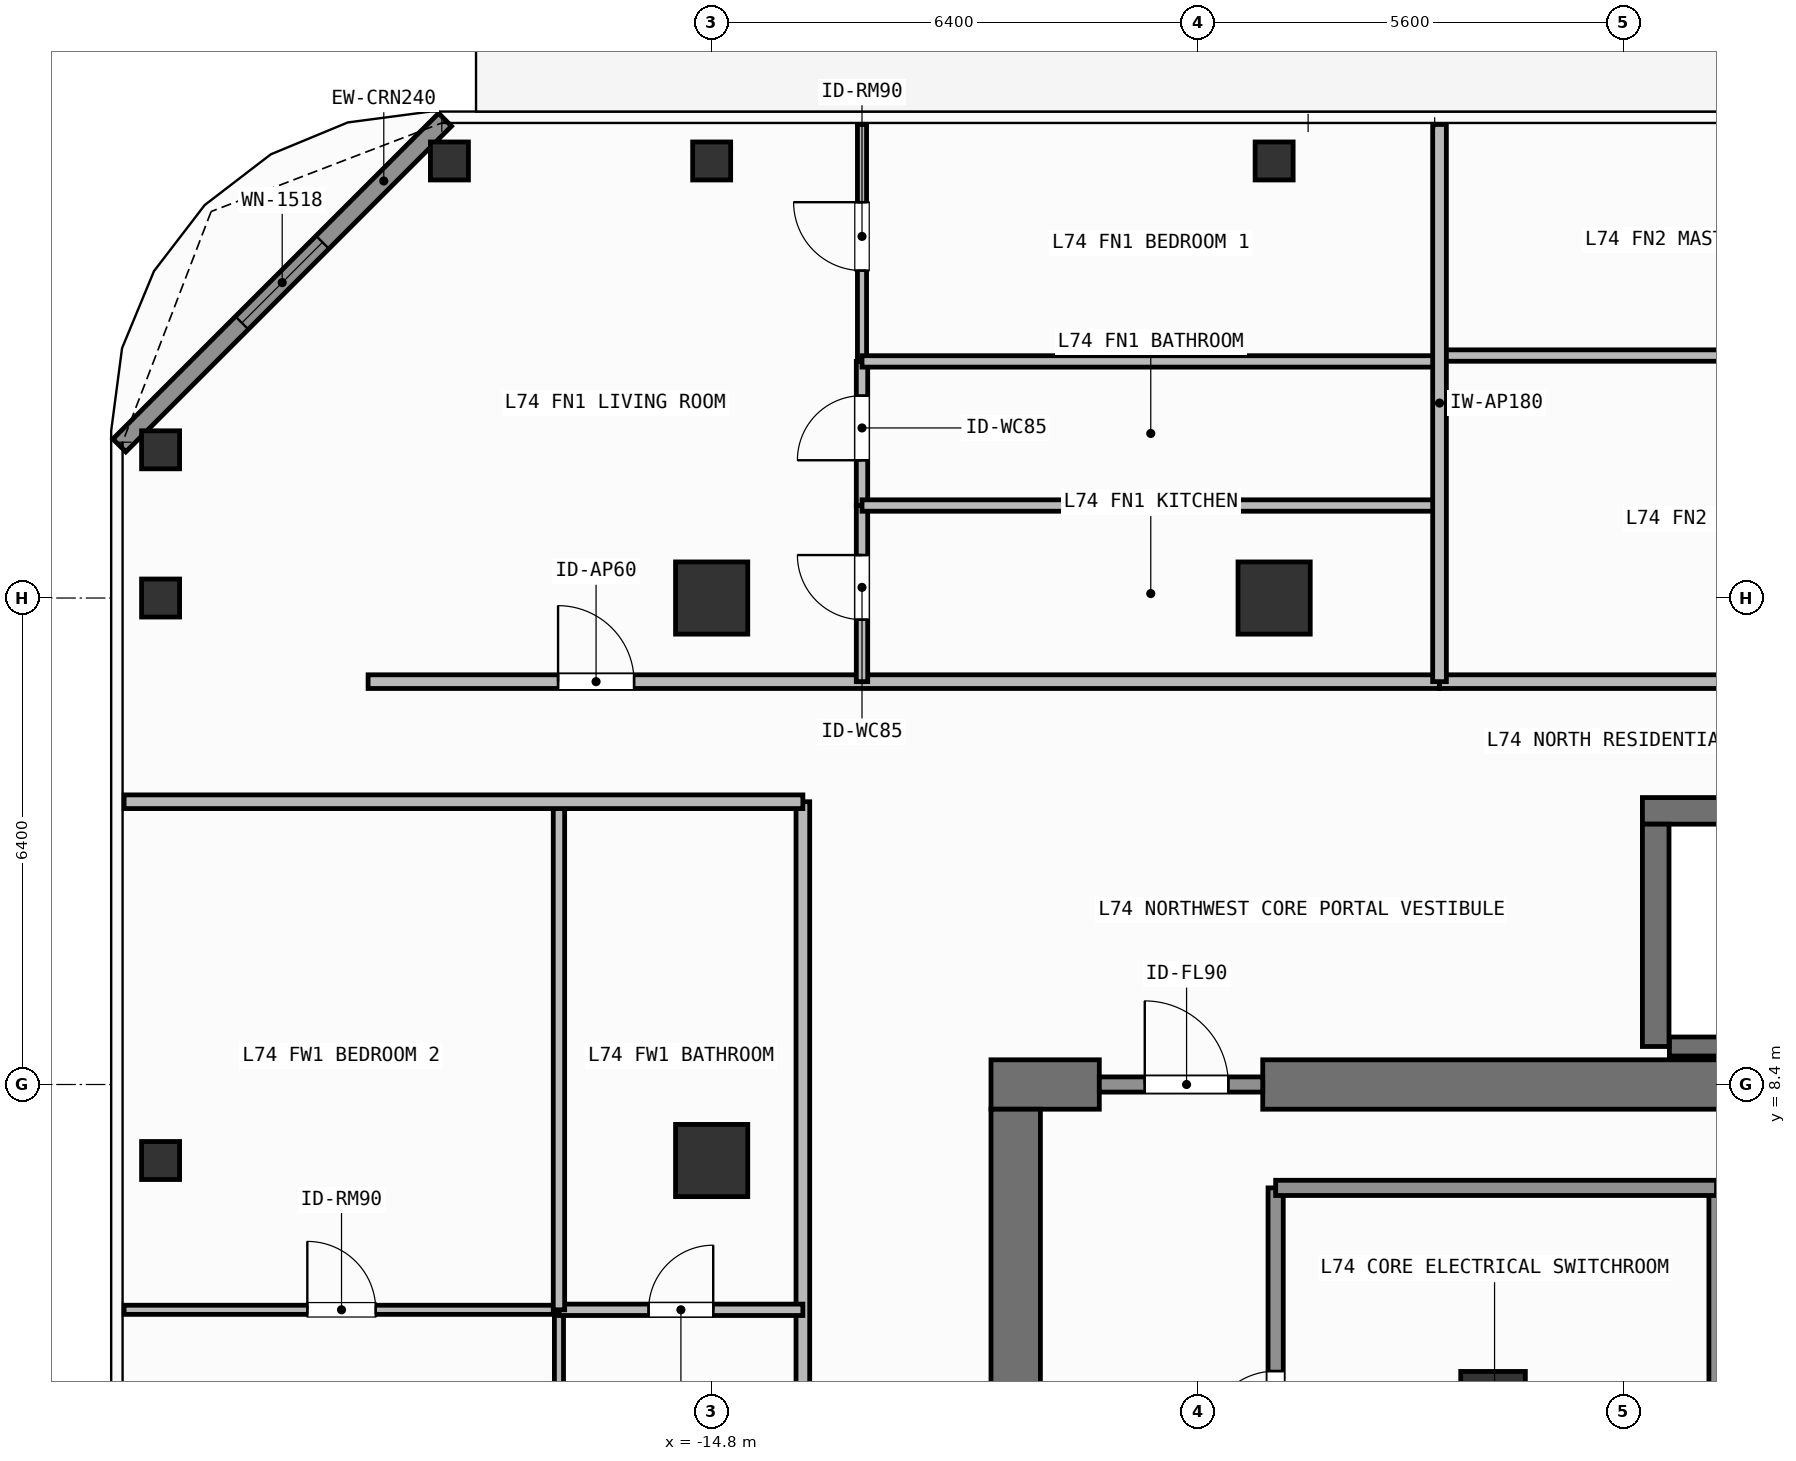
"""IFC4 building model, lengths in metres.
Left out: names, types, materials, properties, quantities, classifications, styles, units other than length and angle.
Written with IfcOpenShell. Run it as: python <this file> out.ifc"""

import sys

from ifc_helpers import new_model, si_unit, direction, frame, frame_2d, origin, origin_2d, place, context, subcontext, project, spatial, rectangle, hollow_rectangle, extrude, element, fill, save


model = new_model("IFC4")
c1 = context("Model", 3, precision=1e-05, world=origin(), true_north=direction((0.0, 1.0)))
c2 = subcontext(c1, "Body", "Model", "MODEL_VIEW")
j1 = project(units=[si_unit("LENGTHUNIT", "METRE"), si_unit("PLANEANGLEUNIT", "RADIAN")], contexts=[c1])
p1 = place(None, origin())
s1 = spatial("IfcSite", under=j1, at=p1, CompositionType="ELEMENT")
p2 = place(p1, origin())
s2 = spatial("IfcBuilding", under=s1, at=p2, CompositionType="ELEMENT")
p3 = place(p2, frame((0.0, 0.0, 301.5)))
s3 = spatial("IfcBuildingStorey", under=s2, at=p3, CompositionType="ELEMENT", Elevation=301.5)
p4 = place(p3, frame((-11.125, 8.4, 0.0), z_axis=(0.0, 0.0, 1.0), x_axis=(1.0, 0.0, 0.0)))
e1 = element("IfcWall", 1, at=p4, inside=s3, PredefinedType="SHEAR", context=c2, shape_type="SweptSolid", body=[
    extrude(rectangle(XDim=1.425, YDim=0.65, at=frame_2d((0.712, 0.0))), origin(), (0.0, 0.0, 1.0), 3.9),
])
p5 = place(p3, frame((-7.55, 8.4, 0.0), z_axis=(0.0, 0.0, 1.0), x_axis=(1.0, 0.0, 0.0)))
e2 = element("IfcWall", 2, at=p5, inside=s3, PredefinedType="SHEAR", context=c2, shape_type="SweptSolid", body=[
    extrude(rectangle(XDim=16.275, YDim=0.65, at=frame_2d((8.138, 0.0))), origin(), (0.0, 0.0, 1.0), 3.9),
])
p6 = place(p3, frame((-10.8, -8.075, 0.0), z_axis=(0.0, 0.0, 1.0), x_axis=(0.0, 1.0, 0.0)))
e3 = element("IfcWall", 3, at=p6, inside=s3, PredefinedType="SHEAR", context=c2, shape_type="SweptSolid", body=[
    extrude(rectangle(XDim=16.15, YDim=0.65, at=frame_2d((8.075, 0.0))), origin(), (0.0, 0.0, 1.0), 3.9),
])
p7 = place(p3, frame((-2.555, 12.0, 0.0), z_axis=(0.0, 0.0, 1.0), x_axis=(1.0, 0.0, 0.0)))
e4 = element("IfcWall", 4, at=p7, inside=s3, PredefinedType="SHEAR", context=c2, shape_type="SweptSolid", body=[
    extrude(rectangle(XDim=7.31, YDim=0.35, at=frame_2d((3.655, 0.0))), origin(), (0.0, 0.0, 1.0), 3.9),
])
p8 = place(p3, frame((-2.2, 8.9, 0.0), z_axis=(0.0, 0.0, 1.0), x_axis=(1.0, 0.0, 0.0)))
e5 = element("IfcWall", 5, at=p8, inside=s3, PredefinedType="SHEAR", context=c2, shape_type="SweptSolid", body=[
    extrude(rectangle(XDim=6.6, YDim=0.25, at=frame_2d((3.3, 0.0))), origin(), (0.0, 0.0, 1.0), 3.9),
])
p9 = place(p3, frame((-2.38, 8.9, 0.0), z_axis=(0.0, 0.0, 1.0), x_axis=(0.0, 1.0, 0.0)))
e6 = element("IfcWall", 6, at=p9, inside=s3, PredefinedType="SHEAR", context=c2, shape_type="SweptSolid", body=[
    extrude(rectangle(XDim=2.925, YDim=0.35, at=frame_2d((1.462, 0.0))), origin(), (0.0, 0.0, 1.0), 3.9),
])
for number, where, z_axis, x_axis in (
    (7, (-14.8, 14.8, 0.0), (0.0, 0.0, 1.0), (1.0, 0.0, 0.0)),
    (8, (-7.4, 14.8, 0.0), (0.0, 0.0, 1.0), (1.0, 0.0, 0.0)),
    (9, (-14.8, 7.4, 0.0), (0.0, 0.0, 1.0), (1.0, 0.0, 0.0)),
):
    element("IfcColumn", number, at=place(p3, frame(where, z_axis=z_axis, x_axis=x_axis)), inside=s3, PredefinedType="COLUMN", context=c2, shape_type="SweptSolid", body=[
        extrude(rectangle(XDim=0.95, YDim=0.95, at=origin_2d()), origin(), (0.0, 0.0, 1.0), 3.9),
    ])
p10 = place(p3, frame((-4.52, 4.2, 0.0), z_axis=(0.0, 0.0, 1.0), x_axis=(1.0, 0.0, 0.0)))
e10 = element("IfcColumn", 10, at=p10, inside=s3, PredefinedType="COLUMN", context=c2, shape_type="SweptSolid", body=[
    extrude(rectangle(XDim=0.85, YDim=0.85, at=origin_2d()), origin(), (0.0, 0.0, 1.0), 3.9),
])
for number, where, z_axis, x_axis in (
    (11, (-18.25, 20.55, 0.0), (0.0, 0.0, 1.0), (1.0, 0.0, 0.0)),
    (12, (-22.05, 16.75, 0.0), (0.0, 0.0, 1.0), (1.0, 0.0, 0.0)),
    (13, (-14.8, 20.55, 0.0), (0.0, 0.0, 1.0), (1.0, 0.0, 0.0)),
    (14, (-7.4, 20.55, 0.0), (0.0, 0.0, 1.0), (1.0, 0.0, 0.0)),
    (15, (-22.05, 7.4, 0.0), (0.0, 0.0, 1.0), (1.0, 0.0, 0.0)),
    (16, (-22.05, 14.8, 0.0), (0.0, 0.0, 1.0), (1.0, 0.0, 0.0)),
):
    element("IfcColumn", number, at=place(p3, frame(where, z_axis=z_axis, x_axis=x_axis)), inside=s3, PredefinedType="COLUMN", context=c2, shape_type="SweptSolid", body=[
        extrude(hollow_rectangle(XDim=0.5, YDim=0.5, WallThickness=0.025, at=origin_2d()), origin(), (0.0, 0.0, 1.0), 3.9),
    ])
p11 = place(p3, frame((-22.592, 16.808, 0.0), z_axis=(0.0, 0.0, 1.0), x_axis=(0.707106781187, 0.707106781187, 0.0)))
e17 = element("IfcWall", 17, at=p11, inside=s3, PredefinedType="SOLIDWALL", context=c2, shape_type="SweptSolid", body=[
    extrude(rectangle(XDim=6.059, YDim=0.24, at=frame_2d((3.03, 0.0))), origin(), (0.0, 0.0, 1.0), 3.68),
])
p12 = place(p11, frame((2.28, 0.0, 0.8)))
e18 = element("IfcOpeningElement", 18, at=p12, cuts=e17, PredefinedType="OPENING", context=c2, shape_type="SweptSolid", body=[
    extrude(rectangle(XDim=1.5, YDim=1.85, at=frame_2d((0.75, 0.925))), frame((0.0, 0.13, 0.0), z_axis=(0.0, -1.0, 0.0), x_axis=(1.0, 0.0, 0.0)), (0.0, 0.0, 1.0), 0.26),
])
p13 = place(p3, frame((-9.7, 8.4, 0.0), z_axis=(0.0, 0.0, 1.0), x_axis=(1.0, 0.0, 0.0)))
e19 = element("IfcWall", 19, at=p13, inside=s3, PredefinedType="SOLIDWALL", context=c2, shape_type="SweptSolid", body=[
    extrude(rectangle(XDim=2.15, YDim=0.2, at=frame_2d((1.075, 0.0))), origin(), (0.0, 0.0, 1.0), 2.92),
])
p14 = place(p13, frame((0.598, 0.0, 0.0)))
e20 = element("IfcOpeningElement", 20, at=p14, cuts=e19, PredefinedType="OPENING", context=c2, shape_type="SweptSolid", body=[
    extrude(rectangle(XDim=1.1, YDim=2.15, at=frame_2d((0.55, 1.075))), frame((0.0, 0.11, 0.0), z_axis=(0.0, -1.0, 0.0), x_axis=(1.0, 0.0, 0.0)), (0.0, 0.0, 1.0), 0.22),
])
p15 = place(p3, frame((-7.38, 1.3, 0.0), z_axis=(0.0, 0.0, 1.0), x_axis=(0.0, 1.0, 0.0)))
e21 = element("IfcWall", 21, at=p15, inside=s3, PredefinedType="SOLIDWALL", context=c2, shape_type="SweptSolid", body=[
    extrude(rectangle(XDim=5.74, YDim=0.2, at=frame_2d((2.87, 0.0))), origin(), (0.0, 0.0, 1.0), 3.68),
])
p16 = place(p15, frame((2.41, 0.0, 0.0)))
e22 = element("IfcOpeningElement", 22, at=p16, cuts=e21, PredefinedType="OPENING", context=c2, shape_type="SweptSolid", body=[
    extrude(rectangle(XDim=0.92, YDim=2.1, at=frame_2d((0.46, 1.05))), frame((0.0, 0.11, 0.0), z_axis=(0.0, -1.0, 0.0), x_axis=(1.0, 0.0, 0.0)), (0.0, 0.0, 1.0), 0.22),
])
p17 = place(p3, frame((-19.32, 13.7, 0.0), z_axis=(0.0, 0.0, 1.0), x_axis=(1.0, 0.0, 0.0)))
e23 = element("IfcWall", 23, at=p17, inside=s3, PredefinedType="PARTITIONING", context=c2, shape_type="SweptSolid", body=[
    extrude(rectangle(XDim=14.096, YDim=0.18, at=frame_2d((7.048, 0.0))), origin(), (0.0, 0.0, 1.0), 3.68),
])
p18 = place(p17, frame((2.499, 0.0, 0.0)))
e24 = element("IfcOpeningElement", 24, at=p18, cuts=e23, PredefinedType="OPENING", context=c2, shape_type="SweptSolid", body=[
    extrude(rectangle(XDim=1.0, YDim=2.2, at=frame_2d((0.5, 1.1))), frame((0.0, 0.1, 0.0), z_axis=(0.0, -1.0, 0.0), x_axis=(1.0, 0.0, 0.0)), (0.0, 0.0, 1.0), 0.2),
])
p19 = place(p3, frame((-12.822, 13.7, 0.0), z_axis=(0.0, 0.0, 1.0), x_axis=(0.0, 1.0, 0.0)))
e25 = element("IfcWall", 25, at=p19, inside=s3, PredefinedType="PARTITIONING", context=c2, shape_type="SweptSolid", body=[
    extrude(rectangle(XDim=2.317, YDim=0.15, at=frame_2d((1.159, 0.0))), origin(), (0.0, 0.0, 1.0), 3.68),
])
p20 = place(p19, frame((0.815, 0.0, 0.0)))
e26 = element("IfcOpeningElement", 26, at=p20, cuts=e25, PredefinedType="OPENING", context=c2, shape_type="SweptSolid", body=[
    extrude(rectangle(XDim=0.85, YDim=2.1, at=frame_2d((0.425, 1.05))), frame((0.0, 0.085, 0.0), z_axis=(0.0, -1.0, 0.0), x_axis=(1.0, 0.0, 0.0)), (0.0, 0.0, 1.0), 0.17),
])
p21 = place(p3, frame((-12.822, 16.017, 0.0), z_axis=(0.0, 0.0, 1.0), x_axis=(0.0, 1.0, 0.0)))
e27 = element("IfcWall", 27, at=p21, inside=s3, PredefinedType="PARTITIONING", context=c2, shape_type="SweptSolid", body=[
    extrude(rectangle(XDim=1.896, YDim=0.15, at=frame_2d((0.948, 0.0))), origin(), (0.0, 0.0, 1.0), 3.68),
])
p22 = place(p21, frame((0.596, 0.0, 0.0)))
e28 = element("IfcOpeningElement", 28, at=p22, cuts=e27, PredefinedType="OPENING", context=c2, shape_type="SweptSolid", body=[
    extrude(rectangle(XDim=0.85, YDim=2.1, at=frame_2d((0.425, 1.05))), frame((0.0, 0.085, 0.0), z_axis=(0.0, -1.0, 0.0), x_axis=(1.0, 0.0, 0.0)), (0.0, 0.0, 1.0), 0.17),
])
p23 = place(p3, frame((-12.822, 17.913, 0.0), z_axis=(0.0, 0.0, 1.0), x_axis=(0.0, 1.0, 0.0)))
e29 = element("IfcWall", 29, at=p23, inside=s3, PredefinedType="PARTITIONING", context=c2, shape_type="SweptSolid", body=[
    extrude(rectangle(XDim=3.117, YDim=0.12, at=frame_2d((1.559, 0.0))), origin(), (0.0, 0.0, 1.0), 3.68),
])
p24 = place(p23, frame((1.195, 0.0, 0.0)))
e30 = element("IfcOpeningElement", 30, at=p24, cuts=e29, PredefinedType="OPENING", context=c2, shape_type="SweptSolid", body=[
    extrude(rectangle(XDim=0.9, YDim=2.1, at=frame_2d((0.45, 1.05))), frame((0.0, 0.07, 0.0), z_axis=(0.0, -1.0, 0.0), x_axis=(1.0, 0.0, 0.0)), (0.0, 0.0, 1.0), 0.14),
])
p25 = place(p3, frame((-5.224, 13.7, 0.0), z_axis=(0.0, 0.0, 1.0), x_axis=(1.0, 0.0, 0.0)))
e31 = element("IfcWall", 31, at=p25, inside=s3, PredefinedType="PARTITIONING", context=c2, shape_type="SweptSolid", body=[
    extrude(rectangle(XDim=21.144, YDim=0.18, at=frame_2d((10.572, 0.0))), origin(), (0.0, 0.0, 1.0), 3.68),
])
p26 = place(p25, frame((10.876, 0.0, 0.0)))
e32 = element("IfcOpeningElement", 32, at=p26, cuts=e31, PredefinedType="OPENING", context=c2, shape_type="SweptSolid", body=[
    extrude(rectangle(XDim=1.0, YDim=2.2, at=frame_2d((0.5, 1.1))), frame((0.0, 0.1, 0.0), z_axis=(0.0, -1.0, 0.0), x_axis=(1.0, 0.0, 0.0)), (0.0, 0.0, 1.0), 0.2),
])
p27 = place(p3, frame((-13.6, -12.12, 0.0), z_axis=(0.0, 0.0, 1.0), x_axis=(0.0, 1.0, 0.0)))
e33 = element("IfcWall", 33, at=p27, inside=s3, PredefinedType="PARTITIONING", context=c2, shape_type="SweptSolid", body=[
    extrude(rectangle(XDim=24.24, YDim=0.18, at=frame_2d((12.12, 0.0))), origin(), (0.0, 0.0, 1.0), 3.68),
])
p28 = place(p27, frame((9.829, 0.0, 0.0)))
e34 = element("IfcOpeningElement", 34, at=p28, cuts=e33, PredefinedType="OPENING", context=c2, shape_type="SweptSolid", body=[
    extrude(rectangle(XDim=1.0, YDim=2.2, at=frame_2d((0.5, 1.1))), frame((0.0, 0.1, 0.0), z_axis=(0.0, -1.0, 0.0), x_axis=(1.0, 0.0, 0.0)), (0.0, 0.0, 1.0), 0.2),
])
p29 = place(p3, frame((-16.809, -9.32, 0.0), z_axis=(0.0, 0.0, 1.0), x_axis=(0.0, 1.0, 0.0)))
e35 = element("IfcWall", 35, at=p29, inside=s3, PredefinedType="PARTITIONING", context=c2, shape_type="SweptSolid", body=[
    extrude(rectangle(XDim=14.756, YDim=0.12, at=frame_2d((7.378, 0.0))), origin(), (0.0, 0.0, 1.0), 3.68),
])
p30 = place(p29, frame((6.928, 0.0, 0.0)))
e36 = element("IfcOpeningElement", 36, at=p30, cuts=e35, PredefinedType="OPENING", context=c2, shape_type="SweptSolid", body=[
    extrude(rectangle(XDim=0.9, YDim=2.1, at=frame_2d((0.45, 1.05))), frame((0.0, 0.07, 0.0), z_axis=(0.0, -1.0, 0.0), x_axis=(1.0, 0.0, 0.0)), (0.0, 0.0, 1.0), 0.14),
])
p31 = place(p3, frame((-16.809, 5.436, 0.0), z_axis=(0.0, 0.0, 1.0), x_axis=(1.0, 0.0, 0.0)))
e37 = element("IfcWall", 37, at=p31, inside=s3, PredefinedType="PARTITIONING", context=c2, shape_type="SweptSolid", body=[
    extrude(rectangle(XDim=3.209, YDim=0.15, at=frame_2d((1.604, 0.0))), origin(), (0.0, 0.0, 1.0), 3.68),
])
p32 = place(p31, frame((1.179, 0.0, 0.0)))
e38 = element("IfcOpeningElement", 38, at=p32, cuts=e37, PredefinedType="OPENING", context=c2, shape_type="SweptSolid", body=[
    extrude(rectangle(XDim=0.85, YDim=2.1, at=frame_2d((0.425, 1.05))), frame((0.0, 0.085, 0.0), z_axis=(0.0, -1.0, 0.0), x_axis=(1.0, 0.0, 0.0)), (0.0, 0.0, 1.0), 0.17),
])
p33 = place(p3, frame((-22.53, 5.436, 0.0), z_axis=(0.0, 0.0, 1.0), x_axis=(1.0, 0.0, 0.0)))
e39 = element("IfcWall", 39, at=p33, inside=s3, PredefinedType="PARTITIONING", context=c2, shape_type="SweptSolid", body=[
    extrude(rectangle(XDim=5.721, YDim=0.12, at=frame_2d((2.86, 0.0))), origin(), (0.0, 0.0, 1.0), 3.68),
])
p34 = place(p33, frame((2.41, 0.0, 0.0)))
e40 = element("IfcOpeningElement", 40, at=p34, cuts=e39, PredefinedType="OPENING", context=c2, shape_type="SweptSolid", body=[
    extrude(rectangle(XDim=0.9, YDim=2.1, at=frame_2d((0.45, 1.05))), frame((0.0, 0.07, 0.0), z_axis=(0.0, -1.0, 0.0), x_axis=(1.0, 0.0, 0.0)), (0.0, 0.0, 1.0), 0.14),
])
p35 = place(p3, frame((-1.58, 1.3, 0.0), z_axis=(0.0, 0.0, 1.0), x_axis=(0.0, 1.0, 0.0)))
e41 = element("IfcWall", 41, at=p35, inside=s3, PredefinedType="SOLIDWALL", context=c2, shape_type="SweptSolid", body=[
    extrude(rectangle(XDim=5.74, YDim=0.2, at=frame_2d((2.87, 0.0))), origin(), (0.0, 0.0, 1.0), 3.68),
])
p36 = place(p3, frame((-7.38, 7.04, 0.0), z_axis=(0.0, 0.0, 1.0), x_axis=(1.0, 0.0, 0.0)))
e42 = element("IfcWall", 42, at=p36, inside=s3, PredefinedType="SOLIDWALL", context=c2, shape_type="SweptSolid", body=[
    extrude(rectangle(XDim=5.8, YDim=0.2, at=frame_2d((2.9, 0.0))), origin(), (0.0, 0.0, 1.0), 3.68),
])
for number, where, z_axis, x_axis in (
    (43, (-12.822, 16.017, 0.0), (0.0, 0.0, 1.0), (1.0, 0.0, 0.0)),
    (44, (-12.822, 17.913, 0.0), (0.0, 0.0, 1.0), (1.0, 0.0, 0.0)),
):
    element("IfcWall", number, at=place(p3, frame(where, z_axis=z_axis, x_axis=x_axis)), inside=s3, PredefinedType="PARTITIONING", context=c2, shape_type="SweptSolid", body=[
        extrude(rectangle(XDim=7.598, YDim=0.15, at=frame_2d((3.799, 0.0))), origin(), (0.0, 0.0, 1.0), 3.68),
    ])
p37 = place(p3, frame((-5.224, 17.99, 0.0), z_axis=(0.0, 0.0, 1.0), x_axis=(1.0, 0.0, 0.0)))
e45 = element("IfcWall", 45, at=p37, inside=s3, PredefinedType="PARTITIONING", context=c2, shape_type="SweptSolid", body=[
    extrude(rectangle(XDim=7.188, YDim=0.15, at=frame_2d((3.594, 0.0))), origin(), (0.0, 0.0, 1.0), 3.68),
])
p38 = place(p3, frame((-5.224, 13.7, 0.0), z_axis=(0.0, 0.0, 1.0), x_axis=(0.0, 1.0, 0.0)))
e46 = element("IfcWall", 46, at=p38, inside=s3, PredefinedType="PARTITIONING", context=c2, shape_type="SweptSolid", body=[
    extrude(rectangle(XDim=7.33, YDim=0.18, at=frame_2d((3.665, 0.0))), origin(), (0.0, 0.0, 1.0), 3.68),
])
p39 = place(p3, frame((-16.809, 5.436, 0.0), z_axis=(0.0, 0.0, 1.0), x_axis=(0.0, 1.0, 0.0)))
e47 = element("IfcWall", 47, at=p39, inside=s3, PredefinedType="PARTITIONING", context=c2, shape_type="SweptSolid", body=[
    extrude(rectangle(XDim=6.684, YDim=0.15, at=frame_2d((3.342, 0.0))), origin(), (0.0, 0.0, 1.0), 3.68),
])
p40 = place(p3, frame((-22.53, 12.12, 0.0), z_axis=(0.0, 0.0, 1.0), x_axis=(1.0, 0.0, 0.0)))
e48 = element("IfcWall", 48, at=p40, inside=s3, PredefinedType="PARTITIONING", context=c2, shape_type="SweptSolid", body=[
    extrude(rectangle(XDim=8.93, YDim=0.18, at=frame_2d((4.465, 0.0))), origin(), (0.0, 0.0, 1.0), 3.68),
])
p41 = place(p12, origin())
e49 = element("IfcWindow", 49, at=p41, inside=s3, PartitioningType="SINGLE_PANEL", PredefinedType="WINDOW", context=c2, shape_type="SweptSolid", body=[
    extrude(rectangle(XDim=1.5, YDim=1.85, at=frame_2d((0.75, 0.925))), frame((0.0, 0.03, 0.0), z_axis=(0.0, -1.0, 0.0), x_axis=(1.0, 0.0, 0.0)), (0.0, 0.0, 1.0), 0.06),
])
fill(e18, e49)
p42 = place(p14, origin())
e50 = element("IfcDoor", 50, at=p42, inside=s3, OperationType="SINGLE_SWING_LEFT", PredefinedType="DOOR", context=c2, shape_type="SweptSolid", body=[
    extrude(rectangle(XDim=1.1, YDim=2.15, at=frame_2d((0.55, 1.075))), frame((0.0, 0.025, 0.0), z_axis=(0.0, -1.0, 0.0), x_axis=(1.0, 0.0, 0.0)), (0.0, 0.0, 1.0), 0.05),
])
fill(e20, e50)
p43 = place(p16, origin())
e51 = element("IfcDoor", 51, at=p43, inside=s3, OperationType="SINGLE_SWING_LEFT", PredefinedType="DOOR", context=c2, shape_type="SweptSolid", body=[
    extrude(rectangle(XDim=0.92, YDim=2.1, at=frame_2d((0.46, 1.05))), frame((0.0, 0.025, 0.0), z_axis=(0.0, -1.0, 0.0), x_axis=(1.0, 0.0, 0.0)), (0.0, 0.0, 1.0), 0.05),
])
fill(e22, e51)
p44 = place(p18, origin())
e52 = element("IfcDoor", 52, at=p44, inside=s3, OperationType="SINGLE_SWING_LEFT", PredefinedType="DOOR", context=c2, shape_type="SweptSolid", body=[
    extrude(rectangle(XDim=1.0, YDim=2.2, at=frame_2d((0.5, 1.1))), frame((0.0, 0.025, 0.0), z_axis=(0.0, -1.0, 0.0), x_axis=(1.0, 0.0, 0.0)), (0.0, 0.0, 1.0), 0.05),
])
fill(e24, e52)
p45 = place(p20, origin())
e53 = element("IfcDoor", 53, at=p45, inside=s3, OperationType="SINGLE_SWING_RIGHT", PredefinedType="DOOR", context=c2, shape_type="SweptSolid", body=[
    extrude(rectangle(XDim=0.85, YDim=2.1, at=frame_2d((0.425, 1.05))), frame((0.0, 0.025, 0.0), z_axis=(0.0, -1.0, 0.0), x_axis=(1.0, 0.0, 0.0)), (0.0, 0.0, 1.0), 0.05),
])
fill(e26, e53)
p46 = place(p22, origin())
e54 = element("IfcDoor", 54, at=p46, inside=s3, OperationType="SINGLE_SWING_LEFT", PredefinedType="DOOR", context=c2, shape_type="SweptSolid", body=[
    extrude(rectangle(XDim=0.85, YDim=2.1, at=frame_2d((0.425, 1.05))), frame((0.0, 0.025, 0.0), z_axis=(0.0, -1.0, 0.0), x_axis=(1.0, 0.0, 0.0)), (0.0, 0.0, 1.0), 0.05),
])
fill(e28, e54)
p47 = place(p24, origin())
e55 = element("IfcDoor", 55, at=p47, inside=s3, OperationType="SINGLE_SWING_RIGHT", PredefinedType="DOOR", context=c2, shape_type="SweptSolid", body=[
    extrude(rectangle(XDim=0.9, YDim=2.1, at=frame_2d((0.45, 1.05))), frame((0.0, 0.025, 0.0), z_axis=(0.0, -1.0, 0.0), x_axis=(1.0, 0.0, 0.0)), (0.0, 0.0, 1.0), 0.05),
])
fill(e30, e55)
p48 = place(p32, origin())
e56 = element("IfcDoor", 56, at=p48, inside=s3, OperationType="SINGLE_SWING_RIGHT", PredefinedType="DOOR", context=c2, shape_type="SweptSolid", body=[
    extrude(rectangle(XDim=0.85, YDim=2.1, at=frame_2d((0.425, 1.05))), frame((0.0, 0.025, 0.0), z_axis=(0.0, -1.0, 0.0), x_axis=(1.0, 0.0, 0.0)), (0.0, 0.0, 1.0), 0.05),
])
fill(e38, e56)
p49 = place(p34, origin())
e57 = element("IfcDoor", 57, at=p49, inside=s3, OperationType="SINGLE_SWING_LEFT", PredefinedType="DOOR", context=c2, shape_type="SweptSolid", body=[
    extrude(rectangle(XDim=0.9, YDim=2.1, at=frame_2d((0.45, 1.05))), frame((0.0, 0.025, 0.0), z_axis=(0.0, -1.0, 0.0), x_axis=(1.0, 0.0, 0.0)), (0.0, 0.0, 1.0), 0.05),
])
fill(e40, e57)
save(model, sys.argv[1])
